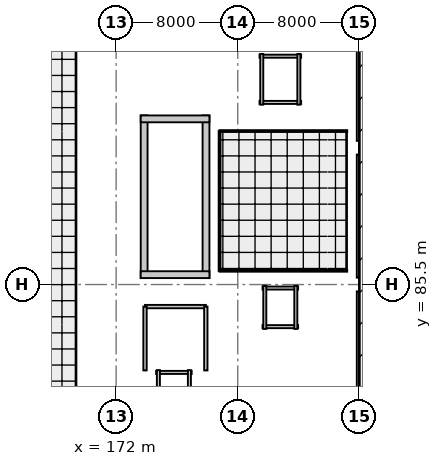
"""IFC4 building model, lengths in metres.
Left out: names, types, materials, properties, quantities, classifications, styles, units other than length and angle.
Written with IfcOpenShell. Run it as: python <this file> out.ifc"""

import sys

from ifc_helpers import new_model, si_unit, direction, frame, frame_2d, origin, origin_2d, place, context, subcontext, project, spatial, rectangle, extrude, element, fill, save


model = new_model("IFC4")
c1 = context("Model", 3, precision=1e-05, world=origin(), true_north=direction((0.0, 1.0)))
c2 = subcontext(c1, "Body", "Model", "MODEL_VIEW")
j1 = project(units=[si_unit("LENGTHUNIT", "METRE"), si_unit("PLANEANGLEUNIT", "RADIAN")], contexts=[c1])
p1 = place(None, origin())
s1 = spatial("IfcSite", under=j1, at=p1, CompositionType="ELEMENT")
p2 = place(p1, origin())
s2 = spatial("IfcBuilding", under=s1, at=p2, CompositionType="ELEMENT")
p3 = place(p2, origin())
s3 = spatial("IfcBuildingStorey", under=s2, at=p3, CompositionType="ELEMENT", Elevation=0.0)
for number, where, z_axis, x_axis in (
    (1, (172.0, 85.5, 0.0), (0.0, 0.0, 1.0), (1.0, 0.0, 0.0)),
    (2, (172.0, 94.5, 0.0), (0.0, 0.0, 1.0), (1.0, 0.0, 0.0)),
    (3, (180.0, 85.5, 0.0), (0.0, 0.0, 1.0), (1.0, 0.0, 0.0)),
    (4, (180.0, 94.5, 0.0), (0.0, 0.0, 1.0), (1.0, 0.0, 0.0)),
    (5, (188.0, 85.5, 0.0), (0.0, 0.0, 1.0), (1.0, 0.0, 0.0)),
    (6, (188.0, 94.5, 0.0), (0.0, 0.0, 1.0), (1.0, 0.0, 0.0)),
):
    element("IfcColumn", number, at=place(p3, frame(where, z_axis=z_axis, x_axis=x_axis)), inside=s3, PredefinedType="COLUMN", context=c2, shape_type="SweptSolid", body=[
        extrude(rectangle(XDim=0.9, YDim=0.9, at=origin_2d()), origin(), (0.0, 0.0, 1.0), 6.6),
    ])
p4 = place(p3, frame((188.0, 85.05, 0.0), z_axis=(0.0, 0.0, 1.0), x_axis=(0.0, -1.0, 0.0)))
e7 = element("IfcWall", 7, at=p4, inside=s3, PredefinedType="SOLIDWALL", context=c2, shape_type="SweptSolid", body=[
    extrude(rectangle(XDim=8.1, YDim=0.34, at=frame_2d((4.05, 0.0))), origin(), (0.0, 0.0, 1.0), 5.875),
])
p5 = place(p4, frame((2.7, 0.0, 0.95)))
e8 = element("IfcOpeningElement", 8, at=p5, cuts=e7, PredefinedType="OPENING", context=c2, shape_type="SweptSolid", body=[
    extrude(rectangle(XDim=2.7, YDim=2.1, at=frame_2d((1.35, 1.05))), frame((0.0, 0.18, 0.0), z_axis=(0.0, -1.0, 0.0), x_axis=(1.0, 0.0, 0.0)), (0.0, 0.0, 1.0), 0.36),
])
p6 = place(p3, frame((188.0, 94.05, 0.0), z_axis=(0.0, 0.0, 1.0), x_axis=(0.0, -1.0, 0.0)))
e9 = element("IfcWall", 9, at=p6, inside=s3, PredefinedType="SOLIDWALL", context=c2, shape_type="SweptSolid", body=[
    extrude(rectangle(XDim=8.1, YDim=0.34, at=frame_2d((4.05, 0.0))), origin(), (0.0, 0.0, 1.0), 5.875),
])
p7 = place(p6, frame((2.85, 0.0, 0.95)))
e10 = element("IfcOpeningElement", 10, at=p7, cuts=e9, PredefinedType="OPENING", context=c2, shape_type="SweptSolid", body=[
    extrude(rectangle(XDim=2.4, YDim=2.1, at=frame_2d((1.2, 1.05))), frame((0.0, 0.18, 0.0), z_axis=(0.0, -1.0, 0.0), x_axis=(1.0, 0.0, 0.0)), (0.0, 0.0, 1.0), 0.36),
])
p8 = place(p3, frame((188.0, 103.05, 0.0), z_axis=(0.0, 0.0, 1.0), x_axis=(0.0, -1.0, 0.0)))
e11 = element("IfcWall", 11, at=p8, inside=s3, PredefinedType="SOLIDWALL", context=c2, shape_type="SweptSolid", body=[
    extrude(rectangle(XDim=8.1, YDim=0.34, at=frame_2d((4.05, 0.0))), origin(), (0.0, 0.0, 1.0), 5.755),
])
p9 = place(p8, frame((3.15, 0.0, 0.0)))
e12 = element("IfcOpeningElement", 12, at=p9, cuts=e11, PredefinedType="OPENING", context=c2, shape_type="SweptSolid", body=[
    extrude(rectangle(XDim=1.8, YDim=2.35, at=frame_2d((0.9, 1.175))), frame((0.0, 0.18, 0.0), z_axis=(0.0, -1.0, 0.0), x_axis=(1.0, 0.0, 0.0)), (0.0, 0.0, 1.0), 0.36),
])
for number, where, z_axis, x_axis in (
    (13, (177.913, 85.925, 0.0), (0.0, 0.0, 1.0), (0.0, 1.0, 0.0)),
    (14, (173.843, 96.623, 0.0), (0.0, 0.0, 1.0), (0.0, -1.0, 0.0)),
):
    element("IfcWall", number, at=place(p3, frame(where, z_axis=z_axis, x_axis=x_axis)), inside=s3, PredefinedType="SHEAR", context=c2, shape_type="SweptSolid", body=[
        extrude(rectangle(XDim=10.698, YDim=0.45, at=frame_2d((5.349, 0.0))), origin(), (0.0, 0.0, 1.0), 6.36),
    ])
p10 = place(p3, frame((178.137, 96.397, 0.0), z_axis=(0.0, 0.0, 1.0), x_axis=(-1.0, 0.0, 0.0)))
e15 = element("IfcWall", 15, at=p10, inside=s3, PredefinedType="SHEAR", context=c2, shape_type="SweptSolid", body=[
    extrude(rectangle(XDim=4.52, YDim=0.45, at=frame_2d((2.26, 0.0))), origin(), (0.0, 0.0, 1.0), 6.36),
])
p11 = place(p3, frame((173.617, 86.15, 0.0), z_axis=(0.0, 0.0, 1.0), x_axis=(1.0, 0.0, 0.0)))
e16 = element("IfcWall", 16, at=p11, inside=s3, PredefinedType="SHEAR", context=c2, shape_type="SweptSolid", body=[
    extrude(rectangle(XDim=4.52, YDim=0.45, at=frame_2d((2.26, 0.0))), origin(), (0.0, 0.0, 1.0), 6.36),
])
p12 = place(p11, frame((1.15, 0.0, 0.0)))
e17 = element("IfcOpeningElement", 17, at=p12, cuts=e16, PredefinedType="OPENING", context=c2, shape_type="SweptSolid", body=[
    extrude(rectangle(XDim=1.3, YDim=2.1, at=frame_2d((0.65, 1.05))), frame((0.0, 0.235, 0.0), z_axis=(0.0, -1.0, 0.0), x_axis=(1.0, 0.0, 0.0)), (0.0, 0.0, 1.0), 0.47),
])
p13 = place(p3, frame((176.97, 79.72, 0.0), z_axis=(0.0, 0.0, 1.0), x_axis=(-1.0, 0.0, 0.0)))
e18 = element("IfcWall", 18, at=p13, inside=s3, PredefinedType="SOLIDWALL", context=c2, shape_type="SweptSolid", body=[
    extrude(rectangle(XDim=2.34, YDim=0.2, at=frame_2d((1.17, 0.0))), origin(), (0.0, 0.0, 1.0), 4.4),
])
p14 = place(p13, frame((0.57, 0.0, 0.0)))
e19 = element("IfcOpeningElement", 19, at=p14, cuts=e18, PredefinedType="OPENING", context=c2, shape_type="SweptSolid", body=[
    extrude(rectangle(XDim=1.2, YDim=2.15, at=frame_2d((0.6, 1.075))), frame((0.0, 0.11, 0.0), z_axis=(0.0, -1.0, 0.0), x_axis=(1.0, 0.0, 0.0)), (0.0, 0.0, 1.0), 0.22),
])
for number, where, z_axis, x_axis in (
    (20, (174.78, 79.87, 0.0), (0.0, 0.0, 1.0), (0.0, -1.0, 0.0)),
    (21, (176.82, 76.73, 0.0), (0.0, 0.0, 1.0), (0.0, 1.0, 0.0)),
):
    element("IfcWall", number, at=place(p3, frame(where, z_axis=z_axis, x_axis=x_axis)), inside=s3, PredefinedType="SOLIDWALL", context=c2, shape_type="SweptSolid", body=[
        extrude(rectangle(XDim=3.14, YDim=0.2, at=frame_2d((1.57, 0.0))), origin(), (0.0, 0.0, 1.0), 4.4),
    ])
p15 = place(p3, frame((181.63, 82.73, 0.0), z_axis=(0.0, 0.0, 1.0), x_axis=(1.0, 0.0, 0.0)))
e22 = element("IfcWall", 22, at=p15, inside=s3, PredefinedType="SOLIDWALL", context=c2, shape_type="SweptSolid", body=[
    extrude(rectangle(XDim=2.34, YDim=0.2, at=frame_2d((1.17, 0.0))), origin(), (0.0, 0.0, 1.0), 4.4),
])
p16 = place(p3, frame((183.97, 85.27, 0.0), z_axis=(0.0, 0.0, 1.0), x_axis=(-1.0, 0.0, 0.0)))
e23 = element("IfcWall", 23, at=p16, inside=s3, PredefinedType="SOLIDWALL", context=c2, shape_type="SweptSolid", body=[
    extrude(rectangle(XDim=2.34, YDim=0.2, at=frame_2d((1.17, 0.0))), origin(), (0.0, 0.0, 1.0), 4.4),
])
p17 = place(p16, frame((0.62, 0.0, 0.0)))
e24 = element("IfcOpeningElement", 24, at=p17, cuts=e23, PredefinedType="OPENING", context=c2, shape_type="SweptSolid", body=[
    extrude(rectangle(XDim=1.1, YDim=2.15, at=frame_2d((0.55, 1.075))), frame((0.0, 0.11, 0.0), z_axis=(0.0, -1.0, 0.0), x_axis=(1.0, 0.0, 0.0)), (0.0, 0.0, 1.0), 0.22),
])
for number, where, z_axis, x_axis in (
    (25, (181.78, 85.42, 0.0), (0.0, 0.0, 1.0), (0.0, -1.0, 0.0)),
    (26, (183.82, 82.58, 0.0), (0.0, 0.0, 1.0), (0.0, 1.0, 0.0)),
):
    element("IfcWall", number, at=place(p3, frame(where, z_axis=z_axis, x_axis=x_axis)), inside=s3, PredefinedType="SOLIDWALL", context=c2, shape_type="SweptSolid", body=[
        extrude(rectangle(XDim=2.84, YDim=0.2, at=frame_2d((1.42, 0.0))), origin(), (0.0, 0.0, 1.0), 4.4),
    ])
for number, where, z_axis, x_axis in (
    (27, (181.43, 97.48, 0.0), (0.0, 0.0, 1.0), (1.0, 0.0, 0.0)),
    (28, (184.17, 100.52, 0.0), (0.0, 0.0, 1.0), (-1.0, 0.0, 0.0)),
):
    element("IfcWall", number, at=place(p3, frame(where, z_axis=z_axis, x_axis=x_axis)), inside=s3, PredefinedType="SOLIDWALL", context=c2, shape_type="SweptSolid", body=[
        extrude(rectangle(XDim=2.74, YDim=0.2, at=frame_2d((1.37, 0.0))), origin(), (0.0, 0.0, 1.0), 4.4),
    ])
p18 = place(p3, frame((181.58, 100.67, 0.0), z_axis=(0.0, 0.0, 1.0), x_axis=(0.0, -1.0, 0.0)))
e29 = element("IfcWall", 29, at=p18, inside=s3, PredefinedType="SOLIDWALL", context=c2, shape_type="SweptSolid", body=[
    extrude(rectangle(XDim=3.34, YDim=0.2, at=frame_2d((1.67, 0.0))), origin(), (0.0, 0.0, 1.0), 4.4),
])
p19 = place(p18, frame((0.92, 0.0, 0.0)))
e30 = element("IfcOpeningElement", 30, at=p19, cuts=e29, PredefinedType="OPENING", context=c2, shape_type="SweptSolid", body=[
    extrude(rectangle(XDim=1.5, YDim=2.2, at=frame_2d((0.75, 1.1))), frame((0.0, 0.11, 0.0), z_axis=(0.0, -1.0, 0.0), x_axis=(1.0, 0.0, 0.0)), (0.0, 0.0, 1.0), 0.22),
])
p20 = place(p3, frame((184.02, 97.33, 0.0), z_axis=(0.0, 0.0, 1.0), x_axis=(0.0, 1.0, 0.0)))
e31 = element("IfcWall", 31, at=p20, inside=s3, PredefinedType="SOLIDWALL", context=c2, shape_type="SweptSolid", body=[
    extrude(rectangle(XDim=3.34, YDim=0.2, at=frame_2d((1.67, 0.0))), origin(), (0.0, 0.0, 1.0), 4.4),
])
p21 = place(p3, frame((187.2, 86.4, 0.0), z_axis=(0.0, 0.0, 1.0), x_axis=(-1.0, 0.0, 0.0)))
e32 = element("IfcWall", 32, at=p21, inside=s3, PredefinedType="PARTITIONING", context=c2, shape_type="SweptSolid", body=[
    extrude(rectangle(XDim=8.4, YDim=0.11, at=frame_2d((4.2, 0.0))), origin(), (0.0, 0.0, 1.0), 4.4),
])
p22 = place(p3, frame((178.8, 95.6, 0.0), z_axis=(0.0, 0.0, 1.0), x_axis=(1.0, 0.0, 0.0)))
e33 = element("IfcWall", 33, at=p22, inside=s3, PredefinedType="PARTITIONING", context=c2, shape_type="SweptSolid", body=[
    extrude(rectangle(XDim=8.4, YDim=0.11, at=frame_2d((4.2, 0.0))), origin(), (0.0, 0.0, 1.0), 4.4),
])
p23 = place(p22, frame((3.625, 0.0, 0.0)))
e34 = element("IfcOpeningElement", 34, at=p23, cuts=e33, PredefinedType="OPENING", context=c2, shape_type="SweptSolid", body=[
    extrude(rectangle(XDim=1.15, YDim=2.1, at=frame_2d((0.575, 1.05))), frame((0.0, 0.065, 0.0), z_axis=(0.0, -1.0, 0.0), x_axis=(1.0, 0.0, 0.0)), (0.0, 0.0, 1.0), 0.13),
])
p24 = place(p3, frame((178.8, 86.4, 0.0), z_axis=(0.0, 0.0, 1.0), x_axis=(0.0, 1.0, 0.0)))
e35 = element("IfcWall", 35, at=p24, inside=s3, PredefinedType="PARTITIONING", context=c2, shape_type="SweptSolid", body=[
    extrude(rectangle(XDim=9.2, YDim=0.11, at=frame_2d((4.6, 0.0))), origin(), (0.0, 0.0, 1.0), 4.4),
])
p25 = place(p3, frame((173.9, 84.05, 0.0), z_axis=(0.0, 0.0, 1.0), x_axis=(1.0, 0.0, 0.0)))
e36 = element("IfcWall", 36, at=p25, inside=s3, PredefinedType="SOLIDWALL", context=c2, shape_type="SweptSolid", body=[
    extrude(rectangle(XDim=4.0, YDim=0.22, at=frame_2d((2.0, 0.0))), origin(), (0.0, 0.0, 1.0), 4.4),
])
p26 = place(p3, frame((173.9, 79.85, 0.0), z_axis=(0.0, 0.0, 1.0), x_axis=(0.0, 1.0, 0.0)))
e37 = element("IfcWall", 37, at=p26, inside=s3, PredefinedType="SOLIDWALL", context=c2, shape_type="SweptSolid", body=[
    extrude(rectangle(XDim=4.2, YDim=0.22, at=frame_2d((2.1, 0.0))), origin(), (0.0, 0.0, 1.0), 4.4),
])
p27 = place(p26, frame((1.4, 0.0, 0.0)))
e38 = element("IfcOpeningElement", 38, at=p27, cuts=e37, PredefinedType="OPENING", context=c2, shape_type="SweptSolid", body=[
    extrude(rectangle(XDim=1.4, YDim=2.1, at=frame_2d((0.7, 1.05))), frame((0.0, 0.12, 0.0), z_axis=(0.0, -1.0, 0.0), x_axis=(1.0, 0.0, 0.0)), (0.0, 0.0, 1.0), 0.24),
])
p28 = place(p3, frame((177.9, 84.05, 0.0), z_axis=(0.0, 0.0, 1.0), x_axis=(0.0, -1.0, 0.0)))
e39 = element("IfcWall", 39, at=p28, inside=s3, PredefinedType="SOLIDWALL", context=c2, shape_type="SweptSolid", body=[
    extrude(rectangle(XDim=4.2, YDim=0.22, at=frame_2d((2.1, 0.0))), origin(), (0.0, 0.0, 1.0), 4.4),
])
p29 = place(p5, origin())
e40 = element("IfcWindow", 40, at=p29, inside=s3, PartitioningType="SINGLE_PANEL", PredefinedType="WINDOW", context=c2, shape_type="SweptSolid", body=[
    extrude(rectangle(XDim=2.7, YDim=2.1, at=frame_2d((1.35, 1.05))), frame((0.0, 0.03, 0.0), z_axis=(0.0, -1.0, 0.0), x_axis=(1.0, 0.0, 0.0)), (0.0, 0.0, 1.0), 0.06),
])
fill(e8, e40)
p30 = place(p7, origin())
e41 = element("IfcWindow", 41, at=p30, inside=s3, PartitioningType="SINGLE_PANEL", PredefinedType="WINDOW", context=c2, shape_type="SweptSolid", body=[
    extrude(rectangle(XDim=2.4, YDim=2.1, at=frame_2d((1.2, 1.05))), frame((0.0, 0.03, 0.0), z_axis=(0.0, -1.0, 0.0), x_axis=(1.0, 0.0, 0.0)), (0.0, 0.0, 1.0), 0.06),
])
fill(e10, e41)
p31 = place(p9, origin())
e42 = element("IfcDoor", 42, at=p31, inside=s3, OperationType="SINGLE_SWING_RIGHT", PredefinedType="DOOR", context=c2, shape_type="SweptSolid", body=[
    extrude(rectangle(XDim=1.8, YDim=2.35, at=frame_2d((0.9, 1.175))), frame((0.0, 0.025, 0.0), z_axis=(0.0, -1.0, 0.0), x_axis=(1.0, 0.0, 0.0)), (0.0, 0.0, 1.0), 0.05),
])
fill(e12, e42)
p32 = place(p12, origin())
e43 = element("IfcDoor", 43, at=p32, inside=s3, OperationType="SINGLE_SWING_RIGHT", PredefinedType="DOOR", context=c2, shape_type="SweptSolid", body=[
    extrude(rectangle(XDim=1.3, YDim=2.1, at=frame_2d((0.65, 1.05))), frame((0.0, 0.025, 0.0), z_axis=(0.0, -1.0, 0.0), x_axis=(1.0, 0.0, 0.0)), (0.0, 0.0, 1.0), 0.05),
])
fill(e17, e43)
p33 = place(p14, origin())
e44 = element("IfcDoor", 44, at=p33, inside=s3, OperationType="SLIDING_TO_LEFT", PredefinedType="DOOR", context=c2, shape_type="SweptSolid", body=[
    extrude(rectangle(XDim=1.2, YDim=2.15, at=frame_2d((0.6, 1.075))), frame((0.0, 0.025, 0.0), z_axis=(0.0, -1.0, 0.0), x_axis=(1.0, 0.0, 0.0)), (0.0, 0.0, 1.0), 0.05),
])
fill(e19, e44)
p34 = place(p17, origin())
e45 = element("IfcDoor", 45, at=p34, inside=s3, OperationType="SLIDING_TO_LEFT", PredefinedType="DOOR", context=c2, shape_type="SweptSolid", body=[
    extrude(rectangle(XDim=1.1, YDim=2.15, at=frame_2d((0.55, 1.075))), frame((0.0, 0.025, 0.0), z_axis=(0.0, -1.0, 0.0), x_axis=(1.0, 0.0, 0.0)), (0.0, 0.0, 1.0), 0.05),
])
fill(e24, e45)
p35 = place(p19, origin())
e46 = element("IfcDoor", 46, at=p35, inside=s3, OperationType="SLIDING_TO_LEFT", PredefinedType="DOOR", context=c2, shape_type="SweptSolid", body=[
    extrude(rectangle(XDim=1.5, YDim=2.2, at=frame_2d((0.75, 1.1))), frame((0.0, 0.025, 0.0), z_axis=(0.0, -1.0, 0.0), x_axis=(1.0, 0.0, 0.0)), (0.0, 0.0, 1.0), 0.05),
])
fill(e30, e46)
p36 = place(p23, origin())
e47 = element("IfcDoor", 47, at=p36, inside=s3, OperationType="SINGLE_SWING_LEFT", PredefinedType="DOOR", context=c2, shape_type="SweptSolid", body=[
    extrude(rectangle(XDim=1.15, YDim=2.1, at=frame_2d((0.575, 1.05))), frame((0.0, 0.025, 0.0), z_axis=(0.0, -1.0, 0.0), x_axis=(1.0, 0.0, 0.0)), (0.0, 0.0, 1.0), 0.05),
])
fill(e34, e47)
p37 = place(p27, origin())
e48 = element("IfcDoor", 48, at=p37, inside=s3, OperationType="SINGLE_SWING_LEFT", PredefinedType="DOOR", context=c2, shape_type="SweptSolid", body=[
    extrude(rectangle(XDim=1.4, YDim=2.1, at=frame_2d((0.7, 1.05))), frame((0.0, 0.025, 0.0), z_axis=(0.0, -1.0, 0.0), x_axis=(1.0, 0.0, 0.0)), (0.0, 0.0, 1.0), 0.05),
])
fill(e38, e48)
save(model, sys.argv[1])
